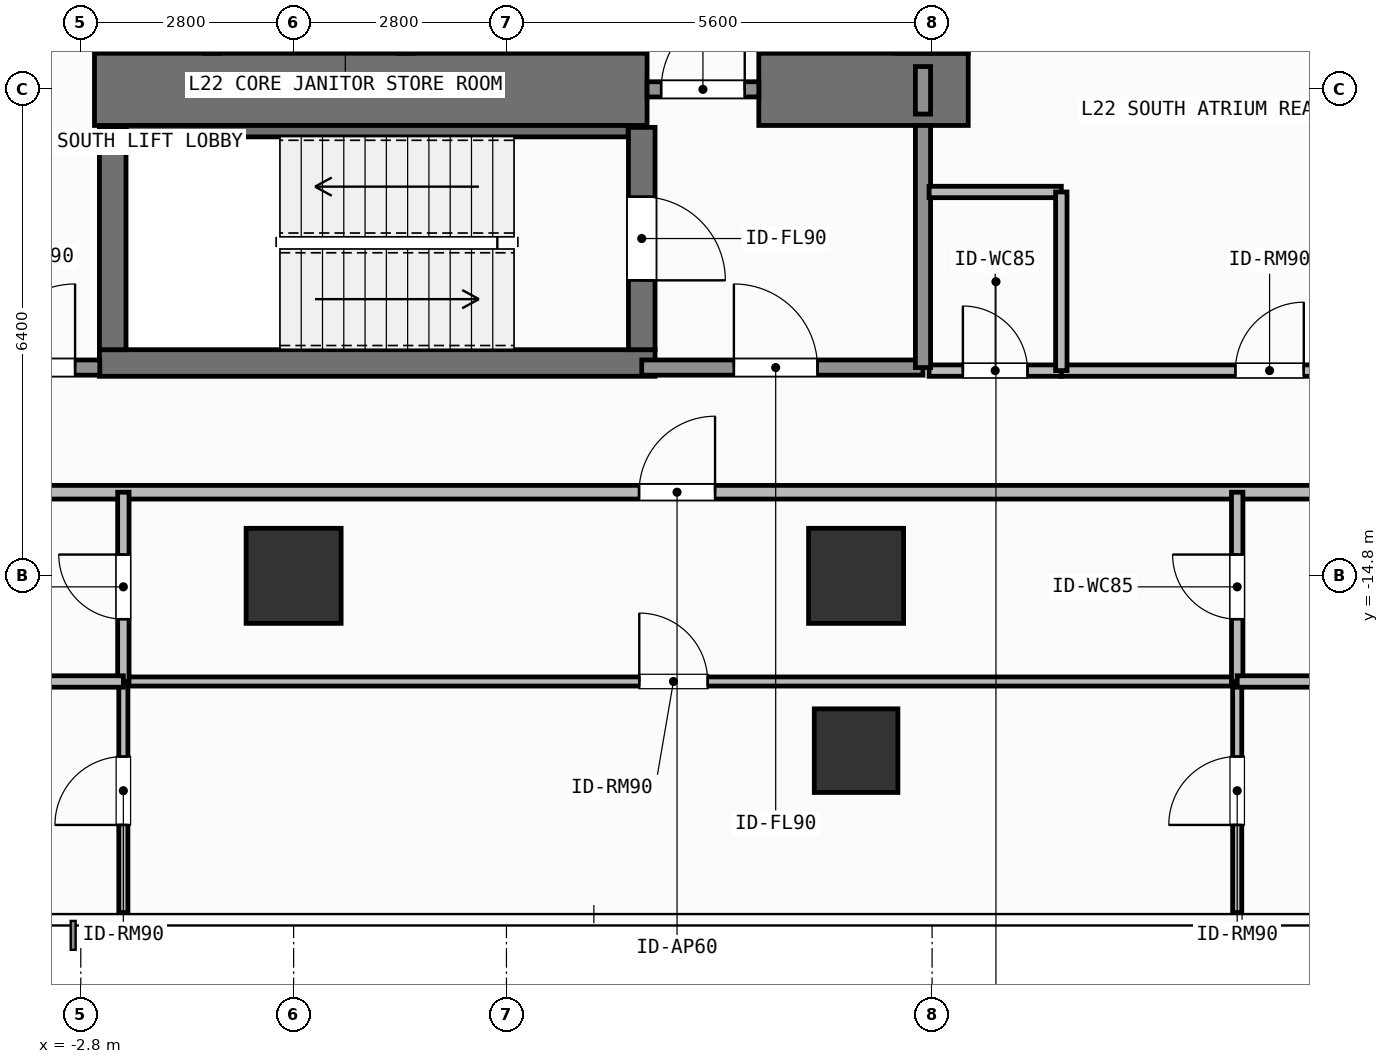
"""IFC4 building model, lengths in metres.
Left out: names, types, materials, properties, quantities, classifications, styles, units other than length and angle.
Written with IfcOpenShell. Run it as: python <this file> out.ifc"""

import sys

from ifc_helpers import new_model, si_unit, direction, frame, frame_2d, origin, origin_2d, place, context, subcontext, project, spatial, rectangle, extrude, element, fill, save


model = new_model("IFC4")
c1 = context("Model", 3, precision=1e-05, world=origin(), true_north=direction((0.0, 1.0)))
c2 = subcontext(c1, "Body", "Model", "MODEL_VIEW")
j1 = project(units=[si_unit("LENGTHUNIT", "METRE"), si_unit("PLANEANGLEUNIT", "RADIAN")], contexts=[c1])
p1 = place(None, origin())
s1 = spatial("IfcSite", under=j1, at=p1, CompositionType="ELEMENT")
p2 = place(p1, origin())
s2 = spatial("IfcBuilding", under=s1, at=p2, CompositionType="ELEMENT")
p3 = place(p2, frame((0.0, 0.0, 89.1)))
s3 = spatial("IfcBuildingStorey", under=s2, at=p3, CompositionType="ELEMENT", Elevation=89.1)
p4 = place(p3, frame((-2.62, -8.4, 0.0), z_axis=(0.0, 0.0, 1.0), x_axis=(1.0, 0.0, 0.0)))
e1 = element("IfcWall", 1, at=p4, inside=s3, PredefinedType="SHEAR", context=c2, shape_type="SweptSolid", body=[
    extrude(rectangle(XDim=7.27, YDim=0.95, at=frame_2d((3.635, 0.0))), origin(), (0.0, 0.0, 1.0), 3.9),
])
p5 = place(p3, frame((6.12, -8.4, 0.0), z_axis=(0.0, 0.0, 1.0), x_axis=(1.0, 0.0, 0.0)))
e2 = element("IfcWall", 2, at=p5, inside=s3, PredefinedType="SHEAR", context=c2, shape_type="SweptSolid", body=[
    extrude(rectangle(XDim=2.755, YDim=0.95, at=frame_2d((1.377, 0.0))), origin(), (0.0, 0.0, 1.0), 3.9),
])
p6 = place(p3, frame((8.4, -7.925, 0.0), z_axis=(0.0, 0.0, 1.0), x_axis=(0.0, 1.0, 0.0)))
e3 = element("IfcWall", 3, at=p6, inside=s3, PredefinedType="SHEAR", context=c2, shape_type="SweptSolid", body=[
    extrude(rectangle(XDim=2.1, YDim=0.95, at=frame_2d((1.05, 0.0))), origin(), (0.0, 0.0, 1.0), 3.9),
])
p7 = place(p3, frame((-2.555, -12.0, 0.0), z_axis=(0.0, 0.0, 1.0), x_axis=(1.0, 0.0, 0.0)))
e4 = element("IfcWall", 4, at=p7, inside=s3, PredefinedType="SHEAR", context=c2, shape_type="SweptSolid", body=[
    extrude(rectangle(XDim=7.31, YDim=0.35, at=frame_2d((3.655, 0.0))), origin(), (0.0, 0.0, 1.0), 3.9),
])
p8 = place(p3, frame((-2.2, -8.95, 0.0), z_axis=(0.0, 0.0, 1.0), x_axis=(1.0, 0.0, 0.0)))
e5 = element("IfcWall", 5, at=p8, inside=s3, PredefinedType="SHEAR", context=c2, shape_type="SweptSolid", body=[
    extrude(rectangle(XDim=6.6, YDim=0.15, at=frame_2d((3.3, 0.0))), origin(), (0.0, 0.0, 1.0), 3.9),
])
p9 = place(p3, frame((-2.38, -11.825, 0.0), z_axis=(0.0, 0.0, 1.0), x_axis=(0.0, 1.0, 0.0)))
e6 = element("IfcWall", 6, at=p9, inside=s3, PredefinedType="SHEAR", context=c2, shape_type="SweptSolid", body=[
    extrude(rectangle(XDim=2.925, YDim=0.35, at=frame_2d((1.462, 0.0))), origin(), (0.0, 0.0, 1.0), 3.9),
])
p10 = place(p3, frame((4.58, -8.9, 0.0), z_axis=(0.0, 0.0, 1.0), x_axis=(0.0, -1.0, 0.0)))
e7 = element("IfcWall", 7, at=p10, inside=s3, PredefinedType="SHEAR", context=c2, shape_type="SweptSolid", body=[
    extrude(rectangle(XDim=2.925, YDim=0.35, at=frame_2d((1.462, 0.0))), origin(), (0.0, 0.0, 1.0), 3.9),
])
p11 = place(p10, frame((0.913, 0.0, 0.0)))
e8 = element("IfcOpeningElement", 8, at=p11, cuts=e7, PredefinedType="OPENING", context=c2, shape_type="SweptSolid", body=[
    extrude(rectangle(XDim=1.1, YDim=2.15, at=frame_2d((0.55, 1.075))), frame((0.0, 0.185, 0.0), z_axis=(0.0, -1.0, 0.0), x_axis=(1.0, 0.0, 0.0)), (0.0, 0.0, 1.0), 0.37),
])
for number, where, z_axis, x_axis in (
    (9, (0.0, -14.8, 0.0), (0.0, 0.0, 1.0), (1.0, 0.0, 0.0)),
    (10, (7.4, -14.8, 0.0), (0.0, 0.0, 1.0), (1.0, 0.0, 0.0)),
):
    element("IfcColumn", number, at=place(p3, frame(where, z_axis=z_axis, x_axis=x_axis)), inside=s3, PredefinedType="COLUMN", context=c2, shape_type="SweptSolid", body=[
        extrude(rectangle(XDim=1.25, YDim=1.25, at=origin_2d()), origin(), (0.0, 0.0, 1.0), 3.9),
    ])
p12 = place(p3, frame((7.4, -17.1, 0.0), z_axis=(0.0, 0.0, 1.0), x_axis=(1.0, 0.0, 0.0)))
e11 = element("IfcColumn", 11, at=p12, inside=s3, PredefinedType="COLUMN", context=c2, shape_type="SweptSolid", body=[
    extrude(rectangle(XDim=1.1, YDim=1.1, at=origin_2d()), origin(), (0.0, 0.0, 1.0), 3.9),
])
p13 = place(p3, frame((-1.075, -7.925, 0.0), z_axis=(0.0, 0.0, 1.0), x_axis=(0.0, 1.0, 0.0)))
e12 = element("IfcWall", 12, at=p13, inside=s3, PredefinedType="SHEAR", context=c2, shape_type="SweptSolid", body=[
    extrude(rectangle(XDim=3.65, YDim=0.2, at=frame_2d((1.825, 0.0))), origin(), (0.0, 0.0, 1.0), 3.68),
])
p14 = place(p3, frame((1.475, -7.925, 0.0), z_axis=(0.0, 0.0, 1.0), x_axis=(0.0, 1.0, 0.0)))
e13 = element("IfcWall", 13, at=p14, inside=s3, PredefinedType="SHEAR", context=c2, shape_type="SweptSolid", body=[
    extrude(rectangle(XDim=3.65, YDim=0.2, at=frame_2d((1.825, 0.0))), origin(), (0.0, 0.0, 1.0), 3.68),
])
p15 = place(p14, frame((1.575, 0.0, 0.0)))
e14 = element("IfcOpeningElement", 14, at=p15, cuts=e13, PredefinedType="OPENING", context=c2, shape_type="SweptSolid", body=[
    extrude(rectangle(XDim=1.1, YDim=2.2, at=frame_2d((0.55, 1.1))), frame((0.0, 0.11, 0.0), z_axis=(0.0, -1.0, 0.0), x_axis=(1.0, 0.0, 0.0)), (0.0, 0.0, 1.0), 0.22),
])
p16 = place(p3, frame((4.58, -12.06, 0.0), z_axis=(0.0, 0.0, 1.0), x_axis=(1.0, 0.0, 0.0)))
e15 = element("IfcWall", 15, at=p16, inside=s3, PredefinedType="SOLIDWALL", context=c2, shape_type="SweptSolid", body=[
    extrude(rectangle(XDim=3.7, YDim=0.2, at=frame_2d((1.85, 0.0))), origin(), (0.0, 0.0, 1.0), 3.68),
])
p17 = place(p16, frame((1.212, 0.0, 0.0)))
e16 = element("IfcOpeningElement", 16, at=p17, cuts=e15, PredefinedType="OPENING", context=c2, shape_type="SweptSolid", body=[
    extrude(rectangle(XDim=1.1, YDim=2.15, at=frame_2d((0.55, 1.075))), frame((0.0, 0.11, 0.0), z_axis=(0.0, -1.0, 0.0), x_axis=(1.0, 0.0, 0.0)), (0.0, 0.0, 1.0), 0.22),
])
p18 = place(p3, frame((4.65, -8.4, 0.0), z_axis=(0.0, 0.0, 1.0), x_axis=(1.0, 0.0, 0.0)))
e17 = element("IfcWall", 17, at=p18, inside=s3, PredefinedType="SOLIDWALL", context=c2, shape_type="SweptSolid", body=[
    extrude(rectangle(XDim=1.47, YDim=0.2, at=frame_2d((0.735, 0.0))), origin(), (0.0, 0.0, 1.0), 2.72),
])
p19 = place(p18, frame((0.185, 0.0, 0.0)))
e18 = element("IfcOpeningElement", 18, at=p19, cuts=e17, PredefinedType="OPENING", context=c2, shape_type="SweptSolid", body=[
    extrude(rectangle(XDim=1.1, YDim=2.15, at=frame_2d((0.55, 1.075))), frame((0.0, 0.11, 0.0), z_axis=(0.0, -1.0, 0.0), x_axis=(1.0, 0.0, 0.0)), (0.0, 0.0, 1.0), 0.22),
])
p20 = place(p3, frame((-4.3, -12.06, 0.0), z_axis=(0.0, 0.0, 1.0), x_axis=(1.0, 0.0, 0.0)))
e19 = element("IfcWall", 19, at=p20, inside=s3, PredefinedType="SOLIDWALL", context=c2, shape_type="SweptSolid", body=[
    extrude(rectangle(XDim=1.75, YDim=0.2, at=frame_2d((0.875, 0.0))), origin(), (0.0, 0.0, 1.0), 3.68),
])
p21 = place(p20, frame((0.325, 0.0, 0.0)))
e20 = element("IfcOpeningElement", 20, at=p21, cuts=e19, PredefinedType="OPENING", context=c2, shape_type="SweptSolid", body=[
    extrude(rectangle(XDim=1.1, YDim=2.15, at=frame_2d((0.55, 1.075))), frame((0.0, 0.11, 0.0), z_axis=(0.0, -1.0, 0.0), x_axis=(1.0, 0.0, 0.0)), (0.0, 0.0, 1.0), 0.22),
])
p22 = place(p3, frame((8.36, -12.1, 0.0), z_axis=(0.0, 0.0, 1.0), x_axis=(1.0, 0.0, 0.0)))
e21 = element("IfcWall", 21, at=p22, inside=s3, PredefinedType="PARTITIONING", context=c2, shape_type="SweptSolid", body=[
    extrude(rectangle(XDim=1.74, YDim=0.15, at=frame_2d((0.87, 0.0))), origin(), (0.0, 0.0, 1.0), 3.68),
])
p23 = place(p22, frame((0.445, 0.0, 0.0)))
e22 = element("IfcOpeningElement", 22, at=p23, cuts=e21, PredefinedType="OPENING", context=c2, shape_type="SweptSolid", body=[
    extrude(rectangle(XDim=0.85, YDim=2.1, at=frame_2d((0.425, 1.05))), frame((0.0, 0.085, 0.0), z_axis=(0.0, -1.0, 0.0), x_axis=(1.0, 0.0, 0.0)), (0.0, 0.0, 1.0), 0.17),
])
p24 = place(p3, frame((10.1, -12.1, 0.0), z_axis=(0.0, 0.0, 1.0), x_axis=(1.0, 0.0, 0.0)))
e23 = element("IfcWall", 23, at=p24, inside=s3, PredefinedType="PARTITIONING", context=c2, shape_type="SweptSolid", body=[
    extrude(rectangle(XDim=5.48, YDim=0.15, at=frame_2d((2.74, 0.0))), origin(), (0.0, 0.0, 1.0), 3.68),
])
p25 = place(p24, frame((2.29, 0.0, 0.0)))
e24 = element("IfcOpeningElement", 24, at=p25, cuts=e23, PredefinedType="OPENING", context=c2, shape_type="SweptSolid", body=[
    extrude(rectangle(XDim=0.9, YDim=2.1, at=frame_2d((0.45, 1.05))), frame((0.0, 0.085, 0.0), z_axis=(0.0, -1.0, 0.0), x_axis=(1.0, 0.0, 0.0)), (0.0, 0.0, 1.0), 0.17),
])
p26 = place(p3, frame((-7.634, -13.7, 0.0), z_axis=(0.0, 0.0, 1.0), x_axis=(1.0, 0.0, 0.0)))
e25 = element("IfcWall", 25, at=p26, inside=s3, PredefinedType="PARTITIONING", context=c2, shape_type="SweptSolid", body=[
    extrude(rectangle(XDim=26.254, YDim=0.18, at=frame_2d((13.127, 0.0))), origin(), (0.0, 0.0, 1.0), 3.68),
])
p27 = place(p26, frame((12.178, 0.0, 0.0)))
e26 = element("IfcOpeningElement", 26, at=p27, cuts=e25, PredefinedType="OPENING", context=c2, shape_type="SweptSolid", body=[
    extrude(rectangle(XDim=1.0, YDim=2.2, at=frame_2d((0.5, 1.1))), frame((0.0, 0.1, 0.0), z_axis=(0.0, -1.0, 0.0), x_axis=(1.0, 0.0, 0.0)), (0.0, 0.0, 1.0), 0.2),
])
p28 = place(p3, frame((-2.24, -16.19, 0.0), z_axis=(0.0, 0.0, 1.0), x_axis=(1.0, 0.0, 0.0)))
e27 = element("IfcWall", 27, at=p28, inside=s3, PredefinedType="PARTITIONING", context=c2, shape_type="SweptSolid", body=[
    extrude(rectangle(XDim=14.654, YDim=0.12, at=frame_2d((7.327, 0.0))), origin(), (0.0, 0.0, 1.0), 3.68),
])
p29 = place(p28, frame((6.787, 0.0, 0.0)))
e28 = element("IfcOpeningElement", 28, at=p29, cuts=e27, PredefinedType="OPENING", context=c2, shape_type="SweptSolid", body=[
    extrude(rectangle(XDim=0.9, YDim=2.1, at=frame_2d((0.45, 1.05))), frame((0.0, 0.07, 0.0), z_axis=(0.0, -1.0, 0.0), x_axis=(1.0, 0.0, 0.0)), (0.0, 0.0, 1.0), 0.14),
])
p30 = place(p3, frame((-2.24, -16.19, 0.0), z_axis=(0.0, 0.0, 1.0), x_axis=(0.0, 1.0, 0.0)))
e29 = element("IfcWall", 29, at=p30, inside=s3, PredefinedType="PARTITIONING", context=c2, shape_type="SweptSolid", body=[
    extrude(rectangle(XDim=2.49, YDim=0.15, at=frame_2d((1.245, 0.0))), origin(), (0.0, 0.0, 1.0), 3.68),
])
p31 = place(p30, frame((0.82, 0.0, 0.0)))
e30 = element("IfcOpeningElement", 30, at=p31, cuts=e29, PredefinedType="OPENING", context=c2, shape_type="SweptSolid", body=[
    extrude(rectangle(XDim=0.85, YDim=2.1, at=frame_2d((0.425, 1.05))), frame((0.0, 0.085, 0.0), z_axis=(0.0, -1.0, 0.0), x_axis=(1.0, 0.0, 0.0)), (0.0, 0.0, 1.0), 0.17),
])
p32 = place(p3, frame((-2.24, -19.23, 0.0), z_axis=(0.0, 0.0, 1.0), x_axis=(0.0, 1.0, 0.0)))
e31 = element("IfcWall", 31, at=p32, inside=s3, PredefinedType="PARTITIONING", context=c2, shape_type="SweptSolid", body=[
    extrude(rectangle(XDim=3.04, YDim=0.12, at=frame_2d((1.52, 0.0))), origin(), (0.0, 0.0, 1.0), 3.68),
])
p33 = place(p32, frame((1.153, 0.0, 0.0)))
e32 = element("IfcOpeningElement", 32, at=p33, cuts=e31, PredefinedType="OPENING", context=c2, shape_type="SweptSolid", body=[
    extrude(rectangle(XDim=0.9, YDim=2.1, at=frame_2d((0.45, 1.05))), frame((0.0, 0.07, 0.0), z_axis=(0.0, -1.0, 0.0), x_axis=(1.0, 0.0, 0.0)), (0.0, 0.0, 1.0), 0.14),
])
p34 = place(p3, frame((12.414, -16.19, 0.0), z_axis=(0.0, 0.0, 1.0), x_axis=(0.0, 1.0, 0.0)))
e33 = element("IfcWall", 33, at=p34, inside=s3, PredefinedType="PARTITIONING", context=c2, shape_type="SweptSolid", body=[
    extrude(rectangle(XDim=2.49, YDim=0.15, at=frame_2d((1.245, 0.0))), origin(), (0.0, 0.0, 1.0), 3.68),
])
p35 = place(p34, frame((0.82, 0.0, 0.0)))
e34 = element("IfcOpeningElement", 34, at=p35, cuts=e33, PredefinedType="OPENING", context=c2, shape_type="SweptSolid", body=[
    extrude(rectangle(XDim=0.85, YDim=2.1, at=frame_2d((0.425, 1.05))), frame((0.0, 0.085, 0.0), z_axis=(0.0, -1.0, 0.0), x_axis=(1.0, 0.0, 0.0)), (0.0, 0.0, 1.0), 0.17),
])
p36 = place(p3, frame((12.414, -19.23, 0.0), z_axis=(0.0, 0.0, 1.0), x_axis=(0.0, 1.0, 0.0)))
e35 = element("IfcWall", 35, at=p36, inside=s3, PredefinedType="PARTITIONING", context=c2, shape_type="SweptSolid", body=[
    extrude(rectangle(XDim=3.04, YDim=0.12, at=frame_2d((1.52, 0.0))), origin(), (0.0, 0.0, 1.0), 3.68),
])
p37 = place(p36, frame((1.153, 0.0, 0.0)))
e36 = element("IfcOpeningElement", 36, at=p37, cuts=e35, PredefinedType="OPENING", context=c2, shape_type="SweptSolid", body=[
    extrude(rectangle(XDim=0.9, YDim=2.1, at=frame_2d((0.45, 1.05))), frame((0.0, 0.07, 0.0), z_axis=(0.0, -1.0, 0.0), x_axis=(1.0, 0.0, 0.0)), (0.0, 0.0, 1.0), 0.14),
])
p38 = place(p3, frame((8.28, -12.06, 0.0), z_axis=(0.0, 0.0, 1.0), x_axis=(0.0, 1.0, 0.0)))
e37 = element("IfcWall", 37, at=p38, inside=s3, PredefinedType="SOLIDWALL", context=c2, shape_type="SweptSolid", body=[
    extrude(rectangle(XDim=3.185, YDim=0.2, at=frame_2d((1.593, 0.0))), origin(), (0.0, 0.0, 1.0), 3.68),
])
p39 = place(p3, frame((8.28, -8.725, 0.0), z_axis=(0.0, 0.0, 1.0), x_axis=(0.0, 1.0, 0.0)))
e38 = element("IfcWall", 38, at=p39, inside=s3, PredefinedType="SOLIDWALL", context=c2, shape_type="SweptSolid", body=[
    extrude(rectangle(XDim=0.625, YDim=0.2, at=frame_2d((0.312, 0.0))), origin(), (0.0, 0.0, 1.0), 3.68),
])
p40 = place(p3, frame((8.36, -9.75, 0.0), z_axis=(0.0, 0.0, 1.0), x_axis=(1.0, 0.0, 0.0)))
e39 = element("IfcWall", 39, at=p40, inside=s3, PredefinedType="PARTITIONING", context=c2, shape_type="SweptSolid", body=[
    extrude(rectangle(XDim=1.74, YDim=0.15, at=frame_2d((0.87, 0.0))), origin(), (0.0, 0.0, 1.0), 3.68),
])
p41 = place(p3, frame((10.1, -12.1, 0.0), z_axis=(0.0, 0.0, 1.0), x_axis=(0.0, 1.0, 0.0)))
e40 = element("IfcWall", 40, at=p41, inside=s3, PredefinedType="PARTITIONING", context=c2, shape_type="SweptSolid", body=[
    extrude(rectangle(XDim=2.35, YDim=0.15, at=frame_2d((1.175, 0.0))), origin(), (0.0, 0.0, 1.0), 3.68),
])
p42 = place(p3, frame((-7.634, -16.19, 0.0), z_axis=(0.0, 0.0, 1.0), x_axis=(1.0, 0.0, 0.0)))
e41 = element("IfcWall", 41, at=p42, inside=s3, PredefinedType="PARTITIONING", context=c2, shape_type="SweptSolid", body=[
    extrude(rectangle(XDim=5.394, YDim=0.15, at=frame_2d((2.697, 0.0))), origin(), (0.0, 0.0, 1.0), 3.68),
])
p43 = place(p3, frame((12.414, -16.19, 0.0), z_axis=(0.0, 0.0, 1.0), x_axis=(1.0, 0.0, 0.0)))
e42 = element("IfcWall", 42, at=p43, inside=s3, PredefinedType="PARTITIONING", context=c2, shape_type="SweptSolid", body=[
    extrude(rectangle(XDim=6.206, YDim=0.15, at=frame_2d((3.103, 0.0))), origin(), (0.0, 0.0, 1.0), 3.68),
])
p44 = place(p11, origin())
e43 = element("IfcDoor", 43, at=p44, inside=s3, OperationType="SINGLE_SWING_RIGHT", PredefinedType="DOOR", context=c2, shape_type="SweptSolid", body=[
    extrude(rectangle(XDim=1.1, YDim=2.15, at=frame_2d((0.55, 1.075))), frame((0.0, 0.025, 0.0), z_axis=(0.0, -1.0, 0.0), x_axis=(1.0, 0.0, 0.0)), (0.0, 0.0, 1.0), 0.05),
])
fill(e8, e43)
p45 = place(p17, origin())
e44 = element("IfcDoor", 44, at=p45, inside=s3, OperationType="SINGLE_SWING_LEFT", PredefinedType="DOOR", context=c2, shape_type="SweptSolid", body=[
    extrude(rectangle(XDim=1.1, YDim=2.15, at=frame_2d((0.55, 1.075))), frame((0.0, 0.025, 0.0), z_axis=(0.0, -1.0, 0.0), x_axis=(1.0, 0.0, 0.0)), (0.0, 0.0, 1.0), 0.05),
])
fill(e16, e44)
p46 = place(p19, origin())
e45 = element("IfcDoor", 45, at=p46, inside=s3, OperationType="SINGLE_SWING_RIGHT", PredefinedType="DOOR", context=c2, shape_type="SweptSolid", body=[
    extrude(rectangle(XDim=1.1, YDim=2.15, at=frame_2d((0.55, 1.075))), frame((0.0, 0.025, 0.0), z_axis=(0.0, -1.0, 0.0), x_axis=(1.0, 0.0, 0.0)), (0.0, 0.0, 1.0), 0.05),
])
fill(e18, e45)
p47 = place(p21, origin())
e46 = element("IfcDoor", 46, at=p47, inside=s3, OperationType="SINGLE_SWING_RIGHT", PredefinedType="DOOR", context=c2, shape_type="SweptSolid", body=[
    extrude(rectangle(XDim=1.1, YDim=2.15, at=frame_2d((0.55, 1.075))), frame((0.0, 0.025, 0.0), z_axis=(0.0, -1.0, 0.0), x_axis=(1.0, 0.0, 0.0)), (0.0, 0.0, 1.0), 0.05),
])
fill(e20, e46)
p48 = place(p23, origin())
e47 = element("IfcDoor", 47, at=p48, inside=s3, OperationType="SINGLE_SWING_LEFT", PredefinedType="DOOR", context=c2, shape_type="SweptSolid", body=[
    extrude(rectangle(XDim=0.85, YDim=2.1, at=frame_2d((0.425, 1.05))), frame((0.0, 0.025, 0.0), z_axis=(0.0, -1.0, 0.0), x_axis=(1.0, 0.0, 0.0)), (0.0, 0.0, 1.0), 0.05),
])
fill(e22, e47)
p49 = place(p25, origin())
e48 = element("IfcDoor", 48, at=p49, inside=s3, OperationType="SINGLE_SWING_RIGHT", PredefinedType="DOOR", context=c2, shape_type="SweptSolid", body=[
    extrude(rectangle(XDim=0.9, YDim=2.1, at=frame_2d((0.45, 1.05))), frame((0.0, 0.025, 0.0), z_axis=(0.0, -1.0, 0.0), x_axis=(1.0, 0.0, 0.0)), (0.0, 0.0, 1.0), 0.05),
])
fill(e24, e48)
p50 = place(p27, origin())
e49 = element("IfcDoor", 49, at=p50, inside=s3, OperationType="SINGLE_SWING_RIGHT", PredefinedType="DOOR", context=c2, shape_type="SweptSolid", body=[
    extrude(rectangle(XDim=1.0, YDim=2.2, at=frame_2d((0.5, 1.1))), frame((0.0, 0.025, 0.0), z_axis=(0.0, -1.0, 0.0), x_axis=(1.0, 0.0, 0.0)), (0.0, 0.0, 1.0), 0.05),
])
fill(e26, e49)
p51 = place(p29, origin())
e50 = element("IfcDoor", 50, at=p51, inside=s3, OperationType="SINGLE_SWING_LEFT", PredefinedType="DOOR", context=c2, shape_type="SweptSolid", body=[
    extrude(rectangle(XDim=0.9, YDim=2.1, at=frame_2d((0.45, 1.05))), frame((0.0, 0.025, 0.0), z_axis=(0.0, -1.0, 0.0), x_axis=(1.0, 0.0, 0.0)), (0.0, 0.0, 1.0), 0.05),
])
fill(e28, e50)
p52 = place(p31, origin())
e51 = element("IfcDoor", 51, at=p52, inside=s3, OperationType="SINGLE_SWING_RIGHT", PredefinedType="DOOR", context=c2, shape_type="SweptSolid", body=[
    extrude(rectangle(XDim=0.85, YDim=2.1, at=frame_2d((0.425, 1.05))), frame((0.0, 0.025, 0.0), z_axis=(0.0, -1.0, 0.0), x_axis=(1.0, 0.0, 0.0)), (0.0, 0.0, 1.0), 0.05),
])
fill(e30, e51)
p53 = place(p33, origin())
e52 = element("IfcDoor", 52, at=p53, inside=s3, OperationType="SINGLE_SWING_LEFT", PredefinedType="DOOR", context=c2, shape_type="SweptSolid", body=[
    extrude(rectangle(XDim=0.9, YDim=2.1, at=frame_2d((0.45, 1.05))), frame((0.0, 0.025, 0.0), z_axis=(0.0, -1.0, 0.0), x_axis=(1.0, 0.0, 0.0)), (0.0, 0.0, 1.0), 0.05),
])
fill(e32, e52)
p54 = place(p35, origin())
e53 = element("IfcDoor", 53, at=p54, inside=s3, OperationType="SINGLE_SWING_RIGHT", PredefinedType="DOOR", context=c2, shape_type="SweptSolid", body=[
    extrude(rectangle(XDim=0.85, YDim=2.1, at=frame_2d((0.425, 1.05))), frame((0.0, 0.025, 0.0), z_axis=(0.0, -1.0, 0.0), x_axis=(1.0, 0.0, 0.0)), (0.0, 0.0, 1.0), 0.05),
])
fill(e34, e53)
p55 = place(p37, origin())
e54 = element("IfcDoor", 54, at=p55, inside=s3, OperationType="SINGLE_SWING_LEFT", PredefinedType="DOOR", context=c2, shape_type="SweptSolid", body=[
    extrude(rectangle(XDim=0.9, YDim=2.1, at=frame_2d((0.45, 1.05))), frame((0.0, 0.025, 0.0), z_axis=(0.0, -1.0, 0.0), x_axis=(1.0, 0.0, 0.0)), (0.0, 0.0, 1.0), 0.05),
])
fill(e36, e54)
save(model, sys.argv[1])
